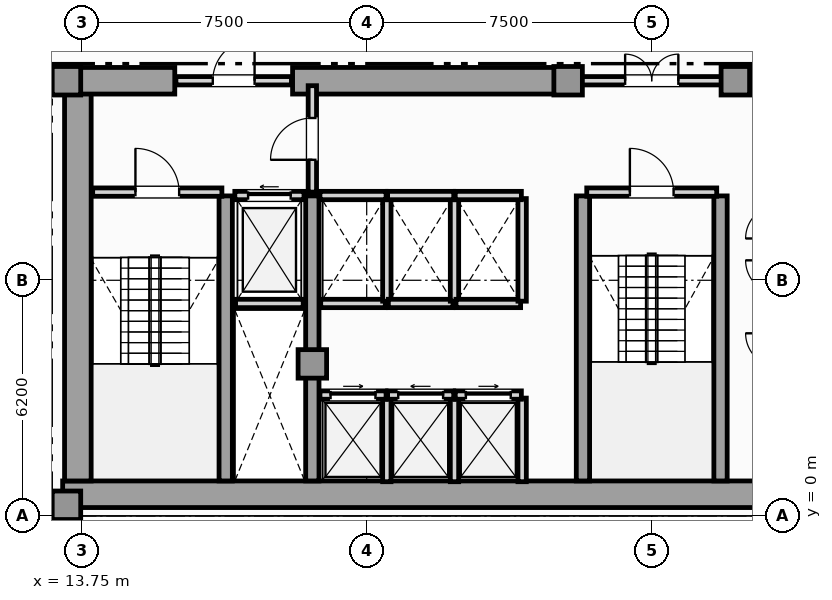
"""IFC4 building model, lengths in metres.
Left out: names, types, materials, properties, quantities, classifications, styles, units other than length and angle.
Written with IfcOpenShell. Run it as: python <this file> out.ifc"""

import sys

from ifc_helpers import new_model, si_unit, direction, frame, frame_2d, origin, origin_2d, place, context, subcontext, project, spatial, rectangle, extrude, element, fill, save


model = new_model("IFC4")
c1 = context("Model", 3, precision=1e-05, world=origin(), true_north=direction((0.0, 1.0)))
c2 = subcontext(c1, "Body", "Model", "MODEL_VIEW")
j1 = project(units=[si_unit("LENGTHUNIT", "METRE"), si_unit("PLANEANGLEUNIT", "RADIAN")], contexts=[c1])
p1 = place(None, origin())
s1 = spatial("IfcSite", under=j1, at=p1, CompositionType="ELEMENT")
p2 = place(p1, origin())
s2 = spatial("IfcBuilding", under=s1, at=p2, CompositionType="ELEMENT")
p3 = place(p2, frame((0.0, 0.0, 104.15)))
s3 = spatial("IfcBuildingStorey", under=s2, at=p3, CompositionType="ELEMENT", Elevation=104.15)
p4 = place(p3, frame((13.25, 0.57, 0.0), z_axis=(0.0, 0.0, 1.0), x_axis=(1.0, 0.0, 0.0)))
e1 = element("IfcWall", 1, at=p4, inside=s3, PredefinedType="SHEAR", context=c2, shape_type="SweptSolid", body=[
    extrude(rectangle(XDim=31.0, YDim=0.7, at=frame_2d((15.5, 0.0))), origin(), (0.0, 0.0, 1.0), 3.6),
])
p5 = place(p3, frame((13.65, 0.92, 0.0), z_axis=(0.0, 0.0, 1.0), x_axis=(0.0, 1.0, 0.0)))
e2 = element("IfcWall", 2, at=p5, inside=s3, PredefinedType="SHEAR", context=c2, shape_type="SweptSolid", body=[
    extrude(rectangle(XDim=10.53, YDim=0.7, at=frame_2d((5.265, 0.0))), origin(), (0.0, 0.0, 1.0), 3.6),
])
p6 = place(p3, frame((13.25, 11.45, 0.0), z_axis=(0.0, 0.0, 1.0), x_axis=(1.0, 0.0, 0.0)))
e3 = element("IfcWall", 3, at=p6, inside=s3, PredefinedType="SHEAR", context=c2, shape_type="SweptSolid", body=[
    extrude(rectangle(XDim=2.95, YDim=0.7, at=frame_2d((1.475, 0.0))), origin(), (0.0, 0.0, 1.0), 3.6),
])
for number, where, z_axis, x_axis in (
    (4, (19.3, 11.45, 0.0), (0.0, 0.0, 1.0), (1.0, 0.0, 0.0)),
    (5, (30.9, 11.45, 0.0), (0.0, 0.0, 1.0), (1.0, 0.0, 0.0)),
):
    element("IfcWall", number, at=place(p3, frame(where, z_axis=z_axis, x_axis=x_axis)), inside=s3, PredefinedType="SHEAR", context=c2, shape_type="SweptSolid", body=[
        extrude(rectangle(XDim=7.3, YDim=0.7, at=frame_2d((3.65, 0.0))), origin(), (0.0, 0.0, 1.0), 3.6),
    ])
for number, where, z_axis, x_axis in (
    (6, (17.54, 0.92, 0.0), (0.0, 0.0, 1.0), (0.0, 1.0, 0.0)),
    (7, (19.82, 0.92, 0.0), (0.0, 0.0, 1.0), (0.0, 1.0, 0.0)),
    (8, (26.94, 0.92, 0.0), (0.0, 0.0, 1.0), (0.0, 1.0, 0.0)),
    (9, (30.56, 0.92, 0.0), (0.0, 0.0, 1.0), (0.0, 1.0, 0.0)),
):
    element("IfcWall", number, at=place(p3, frame(where, z_axis=z_axis, x_axis=x_axis)), inside=s3, PredefinedType="SHEAR", context=c2, shape_type="SweptSolid", body=[
        extrude(rectangle(XDim=7.5, YDim=0.35, at=frame_2d((3.75, 0.0))), origin(), (0.0, 0.0, 1.0), 3.6),
    ])
for number, where, z_axis, x_axis in (
    (10, (13.35, 0.28, 0.0), (0.0, 0.0, 1.0), (1.0, 0.0, 0.0)),
    (11, (13.35, 11.45, 0.0), (0.0, 0.0, 1.0), (1.0, 0.0, 0.0)),
    (12, (19.82, 4.0, 0.0), (0.0, 0.0, 1.0), (1.0, 0.0, 0.0)),
    (13, (26.55, 11.45, 0.0), (0.0, 0.0, 1.0), (1.0, 0.0, 0.0)),
    (14, (30.95, 11.45, 0.0), (0.0, 0.0, 1.0), (1.0, 0.0, 0.0)),
):
    element("IfcColumn", number, at=place(p3, frame(where, z_axis=z_axis, x_axis=x_axis)), inside=s3, PredefinedType="COLUMN", context=c2, shape_type="SweptSolid", body=[
        extrude(rectangle(XDim=0.75, YDim=0.75, at=origin_2d()), origin(), (0.0, 0.0, 1.0), 3.85),
    ])
p7 = place(p3, frame((5.84, 0.18, 0.0), z_axis=(0.0, 0.0, 1.0), x_axis=(1.0, 0.0, 0.0)))
e15 = element("IfcWall", 15, at=p7, inside=s3, PredefinedType="SOLIDWALL", context=c2, shape_type="SweptSolid", body=[
    extrude(rectangle(XDim=7.41, YDim=0.35, at=frame_2d((3.705, 0.0))), origin(), (0.0, 0.0, 1.0), 3.6),
])
p8 = place(p7, frame((2.655, 0.0, 0.85)))
e16 = element("IfcOpeningElement", 16, at=p8, cuts=e15, PredefinedType="OPENING", context=c2, shape_type="SweptSolid", body=[
    extrude(rectangle(XDim=2.1, YDim=2.05, at=frame_2d((1.05, 1.025))), frame((0.0, 0.185, 0.0), z_axis=(0.0, -1.0, 0.0), x_axis=(1.0, 0.0, 0.0)), (0.0, 0.0, 1.0), 0.37),
])
p9 = place(p3, frame((17.8, 5.59, 0.0), z_axis=(0.0, 0.0, 1.0), x_axis=(1.0, 0.0, 0.0)))
e17 = element("IfcWall", 17, at=p9, inside=s3, PredefinedType="SOLIDWALL", context=c2, shape_type="SweptSolid", body=[
    extrude(rectangle(XDim=1.78, YDim=0.22, at=frame_2d((0.89, 0.0))), origin(), (0.0, 0.0, 1.0), 3.6),
])
p10 = place(p3, frame((17.78, 8.43, 0.0), z_axis=(0.0, 0.0, 1.0), x_axis=(1.0, 0.0, 0.0)))
e18 = element("IfcWall", 18, at=p10, inside=s3, PredefinedType="SOLIDWALL", context=c2, shape_type="SweptSolid", body=[
    extrude(rectangle(XDim=1.82, YDim=0.22, at=frame_2d((0.91, 0.0))), origin(), (0.0, 0.0, 1.0), 3.6),
])
p11 = place(p10, frame((0.35, 0.0, 0.0)))
e19 = element("IfcOpeningElement", 19, at=p11, cuts=e18, PredefinedType="OPENING", context=c2, shape_type="SweptSolid", body=[
    extrude(rectangle(XDim=1.12, YDim=2.25, at=frame_2d((0.56, 1.125))), frame((0.0, 0.12, 0.0), z_axis=(0.0, -1.0, 0.0), x_axis=(1.0, 0.0, 0.0)), (0.0, 0.0, 1.0), 0.24),
])
p12 = place(p3, frame((21.78, 0.9, 0.0), z_axis=(0.0, 0.0, 1.0), x_axis=(0.0, 1.0, 0.0)))
e20 = element("IfcWall", 20, at=p12, inside=s3, PredefinedType="SOLIDWALL", context=c2, shape_type="SweptSolid", body=[
    extrude(rectangle(XDim=2.2, YDim=0.22, at=frame_2d((1.1, 0.0))), origin(), (0.0, 0.0, 1.0), 3.6),
])
p13 = place(p3, frame((20.02, 3.18, 0.0), z_axis=(0.0, 0.0, 1.0), x_axis=(1.0, 0.0, 0.0)))
e21 = element("IfcWall", 21, at=p13, inside=s3, PredefinedType="SOLIDWALL", context=c2, shape_type="SweptSolid", body=[
    extrude(rectangle(XDim=1.74, YDim=0.22, at=frame_2d((0.87, 0.0))), origin(), (0.0, 0.0, 1.0), 3.6),
])
p14 = place(p13, frame((0.28, 0.0, 0.0)))
e22 = element("IfcOpeningElement", 22, at=p14, cuts=e21, PredefinedType="OPENING", context=c2, shape_type="SweptSolid", body=[
    extrude(rectangle(XDim=1.18, YDim=2.2, at=frame_2d((0.59, 1.1))), frame((0.0, 0.12, 0.0), z_axis=(0.0, -1.0, 0.0), x_axis=(1.0, 0.0, 0.0)), (0.0, 0.0, 1.0), 0.24),
])
p15 = place(p3, frame((23.56, 0.9, 0.0), z_axis=(0.0, 0.0, 1.0), x_axis=(0.0, 1.0, 0.0)))
e23 = element("IfcWall", 23, at=p15, inside=s3, PredefinedType="SOLIDWALL", context=c2, shape_type="SweptSolid", body=[
    extrude(rectangle(XDim=2.2, YDim=0.22, at=frame_2d((1.1, 0.0))), origin(), (0.0, 0.0, 1.0), 3.6),
])
p16 = place(p3, frame((21.8, 3.18, 0.0), z_axis=(0.0, 0.0, 1.0), x_axis=(1.0, 0.0, 0.0)))
e24 = element("IfcWall", 24, at=p16, inside=s3, PredefinedType="SOLIDWALL", context=c2, shape_type="SweptSolid", body=[
    extrude(rectangle(XDim=1.74, YDim=0.22, at=frame_2d((0.87, 0.0))), origin(), (0.0, 0.0, 1.0), 3.6),
])
p17 = place(p16, frame((0.28, 0.0, 0.0)))
e25 = element("IfcOpeningElement", 25, at=p17, cuts=e24, PredefinedType="OPENING", context=c2, shape_type="SweptSolid", body=[
    extrude(rectangle(XDim=1.18, YDim=2.2, at=frame_2d((0.59, 1.1))), frame((0.0, 0.12, 0.0), z_axis=(0.0, -1.0, 0.0), x_axis=(1.0, 0.0, 0.0)), (0.0, 0.0, 1.0), 0.24),
])
p18 = place(p3, frame((25.34, 0.9, 0.0), z_axis=(0.0, 0.0, 1.0), x_axis=(0.0, 1.0, 0.0)))
e26 = element("IfcWall", 26, at=p18, inside=s3, PredefinedType="SOLIDWALL", context=c2, shape_type="SweptSolid", body=[
    extrude(rectangle(XDim=2.2, YDim=0.22, at=frame_2d((1.1, 0.0))), origin(), (0.0, 0.0, 1.0), 3.6),
])
p19 = place(p3, frame((23.58, 3.18, 0.0), z_axis=(0.0, 0.0, 1.0), x_axis=(1.0, 0.0, 0.0)))
e27 = element("IfcWall", 27, at=p19, inside=s3, PredefinedType="SOLIDWALL", context=c2, shape_type="SweptSolid", body=[
    extrude(rectangle(XDim=1.74, YDim=0.22, at=frame_2d((0.87, 0.0))), origin(), (0.0, 0.0, 1.0), 3.6),
])
p20 = place(p19, frame((0.28, 0.0, 0.0)))
e28 = element("IfcOpeningElement", 28, at=p20, cuts=e27, PredefinedType="OPENING", context=c2, shape_type="SweptSolid", body=[
    extrude(rectangle(XDim=1.18, YDim=2.2, at=frame_2d((0.59, 1.1))), frame((0.0, 0.12, 0.0), z_axis=(0.0, -1.0, 0.0), x_axis=(1.0, 0.0, 0.0)), (0.0, 0.0, 1.0), 0.24),
])
p21 = place(p3, frame((20.04, 5.59, 0.0), z_axis=(0.0, 0.0, 1.0), x_axis=(1.0, 0.0, 0.0)))
e29 = element("IfcWall", 29, at=p21, inside=s3, PredefinedType="SOLIDWALL", context=c2, shape_type="SweptSolid", body=[
    extrude(rectangle(XDim=1.7, YDim=0.22, at=frame_2d((0.85, 0.0))), origin(), (0.0, 0.0, 1.0), 3.6),
])
p22 = place(p3, frame((21.78, 5.65, 0.0), z_axis=(0.0, 0.0, 1.0), x_axis=(0.0, 1.0, 0.0)))
e30 = element("IfcWall", 30, at=p22, inside=s3, PredefinedType="SOLIDWALL", context=c2, shape_type="SweptSolid", body=[
    extrude(rectangle(XDim=2.7, YDim=0.22, at=frame_2d((1.35, 0.0))), origin(), (0.0, 0.0, 1.0), 3.6),
])
p23 = place(p3, frame((20.02, 8.43, 0.0), z_axis=(0.0, 0.0, 1.0), x_axis=(1.0, 0.0, 0.0)))
e31 = element("IfcWall", 31, at=p23, inside=s3, PredefinedType="SOLIDWALL", context=c2, shape_type="SweptSolid", body=[
    extrude(rectangle(XDim=1.74, YDim=0.22, at=frame_2d((0.87, 0.0))), origin(), (0.0, 0.0, 1.0), 3.6),
])
p24 = place(p3, frame((21.82, 5.59, 0.0), z_axis=(0.0, 0.0, 1.0), x_axis=(1.0, 0.0, 0.0)))
e32 = element("IfcWall", 32, at=p24, inside=s3, PredefinedType="SOLIDWALL", context=c2, shape_type="SweptSolid", body=[
    extrude(rectangle(XDim=1.7, YDim=0.22, at=frame_2d((0.85, 0.0))), origin(), (0.0, 0.0, 1.0), 3.6),
])
p25 = place(p3, frame((23.56, 5.65, 0.0), z_axis=(0.0, 0.0, 1.0), x_axis=(0.0, 1.0, 0.0)))
e33 = element("IfcWall", 33, at=p25, inside=s3, PredefinedType="SOLIDWALL", context=c2, shape_type="SweptSolid", body=[
    extrude(rectangle(XDim=2.7, YDim=0.22, at=frame_2d((1.35, 0.0))), origin(), (0.0, 0.0, 1.0), 3.6),
])
p26 = place(p3, frame((21.8, 8.43, 0.0), z_axis=(0.0, 0.0, 1.0), x_axis=(1.0, 0.0, 0.0)))
e34 = element("IfcWall", 34, at=p26, inside=s3, PredefinedType="SOLIDWALL", context=c2, shape_type="SweptSolid", body=[
    extrude(rectangle(XDim=1.74, YDim=0.22, at=frame_2d((0.87, 0.0))), origin(), (0.0, 0.0, 1.0), 3.6),
])
p27 = place(p3, frame((23.6, 5.59, 0.0), z_axis=(0.0, 0.0, 1.0), x_axis=(1.0, 0.0, 0.0)))
e35 = element("IfcWall", 35, at=p27, inside=s3, PredefinedType="SOLIDWALL", context=c2, shape_type="SweptSolid", body=[
    extrude(rectangle(XDim=1.7, YDim=0.22, at=frame_2d((0.85, 0.0))), origin(), (0.0, 0.0, 1.0), 3.6),
])
p28 = place(p3, frame((25.34, 5.65, 0.0), z_axis=(0.0, 0.0, 1.0), x_axis=(0.0, 1.0, 0.0)))
e36 = element("IfcWall", 36, at=p28, inside=s3, PredefinedType="SOLIDWALL", context=c2, shape_type="SweptSolid", body=[
    extrude(rectangle(XDim=2.7, YDim=0.22, at=frame_2d((1.35, 0.0))), origin(), (0.0, 0.0, 1.0), 3.6),
])
p29 = place(p3, frame((23.58, 8.43, 0.0), z_axis=(0.0, 0.0, 1.0), x_axis=(1.0, 0.0, 0.0)))
e37 = element("IfcWall", 37, at=p29, inside=s3, PredefinedType="SOLIDWALL", context=c2, shape_type="SweptSolid", body=[
    extrude(rectangle(XDim=1.74, YDim=0.22, at=frame_2d((0.87, 0.0))), origin(), (0.0, 0.0, 1.0), 3.6),
])
p30 = place(p3, frame((14.04, 8.52, 0.0), z_axis=(0.0, 0.0, 1.0), x_axis=(1.0, 0.0, 0.0)))
e38 = element("IfcWall", 38, at=p30, inside=s3, PredefinedType="SOLIDWALL", context=c2, shape_type="SweptSolid", body=[
    extrude(rectangle(XDim=3.4, YDim=0.22, at=frame_2d((1.7, 0.0))), origin(), (0.0, 0.0, 1.0), 3.6),
])
p31 = place(p30, frame((1.125, 0.0, 0.0)))
e39 = element("IfcOpeningElement", 39, at=p31, cuts=e38, PredefinedType="OPENING", context=c2, shape_type="SweptSolid", body=[
    extrude(rectangle(XDim=1.15, YDim=2.2, at=frame_2d((0.575, 1.1))), frame((0.0, 0.12, 0.0), z_axis=(0.0, -1.0, 0.0), x_axis=(1.0, 0.0, 0.0)), (0.0, 0.0, 1.0), 0.24),
])
p32 = place(p3, frame((27.04, 8.52, 0.0), z_axis=(0.0, 0.0, 1.0), x_axis=(1.0, 0.0, 0.0)))
e40 = element("IfcWall", 40, at=p32, inside=s3, PredefinedType="SOLIDWALL", context=c2, shape_type="SweptSolid", body=[
    extrude(rectangle(XDim=3.42, YDim=0.22, at=frame_2d((1.71, 0.0))), origin(), (0.0, 0.0, 1.0), 3.6),
])
p33 = place(p32, frame((1.135, 0.0, 0.0)))
e41 = element("IfcOpeningElement", 41, at=p33, cuts=e40, PredefinedType="OPENING", context=c2, shape_type="SweptSolid", body=[
    extrude(rectangle(XDim=1.15, YDim=2.2, at=frame_2d((0.575, 1.1))), frame((0.0, 0.12, 0.0), z_axis=(0.0, -1.0, 0.0), x_axis=(1.0, 0.0, 0.0)), (0.0, 0.0, 1.0), 0.24),
])
p34 = place(p3, frame((19.82, 8.52, 0.0), z_axis=(0.0, 0.0, 1.0), x_axis=(0.0, 1.0, 0.0)))
e42 = element("IfcWall", 42, at=p34, inside=s3, PredefinedType="SOLIDWALL", context=c2, shape_type="SweptSolid", body=[
    extrude(rectangle(XDim=2.8, YDim=0.22, at=frame_2d((1.4, 0.0))), origin(), (0.0, 0.0, 1.0), 3.056),
])
p35 = place(p34, frame((0.85, 0.0, 0.0)))
e43 = element("IfcOpeningElement", 43, at=p35, cuts=e42, PredefinedType="OPENING", context=c2, shape_type="SweptSolid", body=[
    extrude(rectangle(XDim=1.1, YDim=2.2, at=frame_2d((0.55, 1.1))), frame((0.0, 0.12, 0.0), z_axis=(0.0, -1.0, 0.0), x_axis=(1.0, 0.0, 0.0)), (0.0, 0.0, 1.0), 0.24),
])
p36 = place(p3, frame((16.23, 11.45, 0.0), z_axis=(0.0, 0.0, 1.0), x_axis=(1.0, 0.0, 0.0)))
e44 = element("IfcWall", 44, at=p36, inside=s3, PredefinedType="SOLIDWALL", context=c2, shape_type="SweptSolid", body=[
    extrude(rectangle(XDim=3.04, YDim=0.22, at=frame_2d((1.52, 0.0))), origin(), (0.0, 0.0, 1.0), 3.6),
])
p37 = place(p36, frame((0.97, 0.0, 0.0)))
e45 = element("IfcOpeningElement", 45, at=p37, cuts=e44, PredefinedType="OPENING", context=c2, shape_type="SweptSolid", body=[
    extrude(rectangle(XDim=1.1, YDim=2.2, at=frame_2d((0.55, 1.1))), frame((0.0, 0.12, 0.0), z_axis=(0.0, -1.0, 0.0), x_axis=(1.0, 0.0, 0.0)), (0.0, 0.0, 1.0), 0.24),
])
p38 = place(p3, frame((26.63, 11.45, 0.0), z_axis=(0.0, 0.0, 1.0), x_axis=(1.0, 0.0, 0.0)))
e46 = element("IfcWall", 46, at=p38, inside=s3, PredefinedType="SOLIDWALL", context=c2, shape_type="SweptSolid", body=[
    extrude(rectangle(XDim=4.24, YDim=0.22, at=frame_2d((2.12, 0.0))), origin(), (0.0, 0.0, 1.0), 3.6),
])
p39 = place(p38, frame((1.42, 0.0, 0.0)))
e47 = element("IfcOpeningElement", 47, at=p39, cuts=e46, PredefinedType="OPENING", context=c2, shape_type="SweptSolid", body=[
    extrude(rectangle(XDim=1.4, YDim=2.2, at=frame_2d((0.7, 1.1))), frame((0.0, 0.12, 0.0), z_axis=(0.0, -1.0, 0.0), x_axis=(1.0, 0.0, 0.0)), (0.0, 0.0, 1.0), 0.24),
])
p40 = place(p3, frame((2.81, 11.6, 0.0), z_axis=(0.0, 0.0, 1.0), x_axis=(1.0, 0.0, 0.0)))
e48 = element("IfcWall", 48, at=p40, inside=s3, PredefinedType="PARTITIONING", context=c2, shape_type="SweptSolid", body=[
    extrude(rectangle(XDim=10.335, YDim=0.18, at=frame_2d((5.167, 0.0))), origin(), (0.0, 0.0, 1.0), 3.6),
])
p41 = place(p40, frame((4.667, 0.0, 0.0)))
e49 = element("IfcOpeningElement", 49, at=p41, cuts=e48, PredefinedType="OPENING", context=c2, shape_type="SweptSolid", body=[
    extrude(rectangle(XDim=1.0, YDim=2.15, at=frame_2d((0.5, 1.075))), frame((0.0, 0.1, 0.0), z_axis=(0.0, -1.0, 0.0), x_axis=(1.0, 0.0, 0.0)), (0.0, 0.0, 1.0), 0.2),
])
p42 = place(p11, origin())
e50 = element("IfcDoor", 50, at=p42, inside=s3, OperationType="SLIDING_TO_LEFT", PredefinedType="DOOR", context=c2, shape_type="SweptSolid", body=[
    extrude(rectangle(XDim=1.12, YDim=2.25, at=frame_2d((0.56, 1.125))), frame((0.0, 0.025, 0.0), z_axis=(0.0, -1.0, 0.0), x_axis=(1.0, 0.0, 0.0)), (0.0, 0.0, 1.0), 0.05),
])
fill(e19, e50)
p43 = place(p14, origin())
e51 = element("IfcDoor", 51, at=p43, inside=s3, OperationType="SLIDING_TO_RIGHT", PredefinedType="DOOR", context=c2, shape_type="SweptSolid", body=[
    extrude(rectangle(XDim=1.18, YDim=2.2, at=frame_2d((0.59, 1.1))), frame((0.0, 0.025, 0.0), z_axis=(0.0, -1.0, 0.0), x_axis=(1.0, 0.0, 0.0)), (0.0, 0.0, 1.0), 0.05),
])
fill(e22, e51)
p44 = place(p17, origin())
e52 = element("IfcDoor", 52, at=p44, inside=s3, OperationType="SLIDING_TO_LEFT", PredefinedType="DOOR", context=c2, shape_type="SweptSolid", body=[
    extrude(rectangle(XDim=1.18, YDim=2.2, at=frame_2d((0.59, 1.1))), frame((0.0, 0.025, 0.0), z_axis=(0.0, -1.0, 0.0), x_axis=(1.0, 0.0, 0.0)), (0.0, 0.0, 1.0), 0.05),
])
fill(e25, e52)
p45 = place(p20, origin())
e53 = element("IfcDoor", 53, at=p45, inside=s3, OperationType="SLIDING_TO_RIGHT", PredefinedType="DOOR", context=c2, shape_type="SweptSolid", body=[
    extrude(rectangle(XDim=1.18, YDim=2.2, at=frame_2d((0.59, 1.1))), frame((0.0, 0.025, 0.0), z_axis=(0.0, -1.0, 0.0), x_axis=(1.0, 0.0, 0.0)), (0.0, 0.0, 1.0), 0.05),
])
fill(e28, e53)
p46 = place(p31, origin())
e54 = element("IfcDoor", 54, at=p46, inside=s3, OperationType="SINGLE_SWING_LEFT", PredefinedType="DOOR", context=c2, shape_type="SweptSolid", body=[
    extrude(rectangle(XDim=1.15, YDim=2.2, at=frame_2d((0.575, 1.1))), frame((0.0, 0.025, 0.0), z_axis=(0.0, -1.0, 0.0), x_axis=(1.0, 0.0, 0.0)), (0.0, 0.0, 1.0), 0.05),
])
fill(e39, e54)
p47 = place(p33, origin())
e55 = element("IfcDoor", 55, at=p47, inside=s3, OperationType="SINGLE_SWING_LEFT", PredefinedType="DOOR", context=c2, shape_type="SweptSolid", body=[
    extrude(rectangle(XDim=1.15, YDim=2.2, at=frame_2d((0.575, 1.1))), frame((0.0, 0.025, 0.0), z_axis=(0.0, -1.0, 0.0), x_axis=(1.0, 0.0, 0.0)), (0.0, 0.0, 1.0), 0.05),
])
fill(e41, e55)
p48 = place(p35, origin())
e56 = element("IfcDoor", 56, at=p48, inside=s3, OperationType="SINGLE_SWING_LEFT", PredefinedType="DOOR", context=c2, shape_type="SweptSolid", body=[
    extrude(rectangle(XDim=1.1, YDim=2.2, at=frame_2d((0.55, 1.1))), frame((0.0, 0.025, 0.0), z_axis=(0.0, -1.0, 0.0), x_axis=(1.0, 0.0, 0.0)), (0.0, 0.0, 1.0), 0.05),
])
fill(e43, e56)
p49 = place(p37, origin())
e57 = element("IfcDoor", 57, at=p49, inside=s3, OperationType="SINGLE_SWING_RIGHT", PredefinedType="DOOR", context=c2, shape_type="SweptSolid", body=[
    extrude(rectangle(XDim=1.1, YDim=2.2, at=frame_2d((0.55, 1.1))), frame((0.0, 0.025, 0.0), z_axis=(0.0, -1.0, 0.0), x_axis=(1.0, 0.0, 0.0)), (0.0, 0.0, 1.0), 0.05),
])
fill(e45, e57)
p50 = place(p39, origin())
e58 = element("IfcDoor", 58, at=p50, inside=s3, OperationType="DOUBLE_DOOR_SINGLE_SWING", PredefinedType="DOOR", context=c2, shape_type="SweptSolid", body=[
    extrude(rectangle(XDim=1.4, YDim=2.2, at=frame_2d((0.7, 1.1))), frame((0.0, 0.025, 0.0), z_axis=(0.0, -1.0, 0.0), x_axis=(1.0, 0.0, 0.0)), (0.0, 0.0, 1.0), 0.05),
])
fill(e47, e58)
save(model, sys.argv[1])
